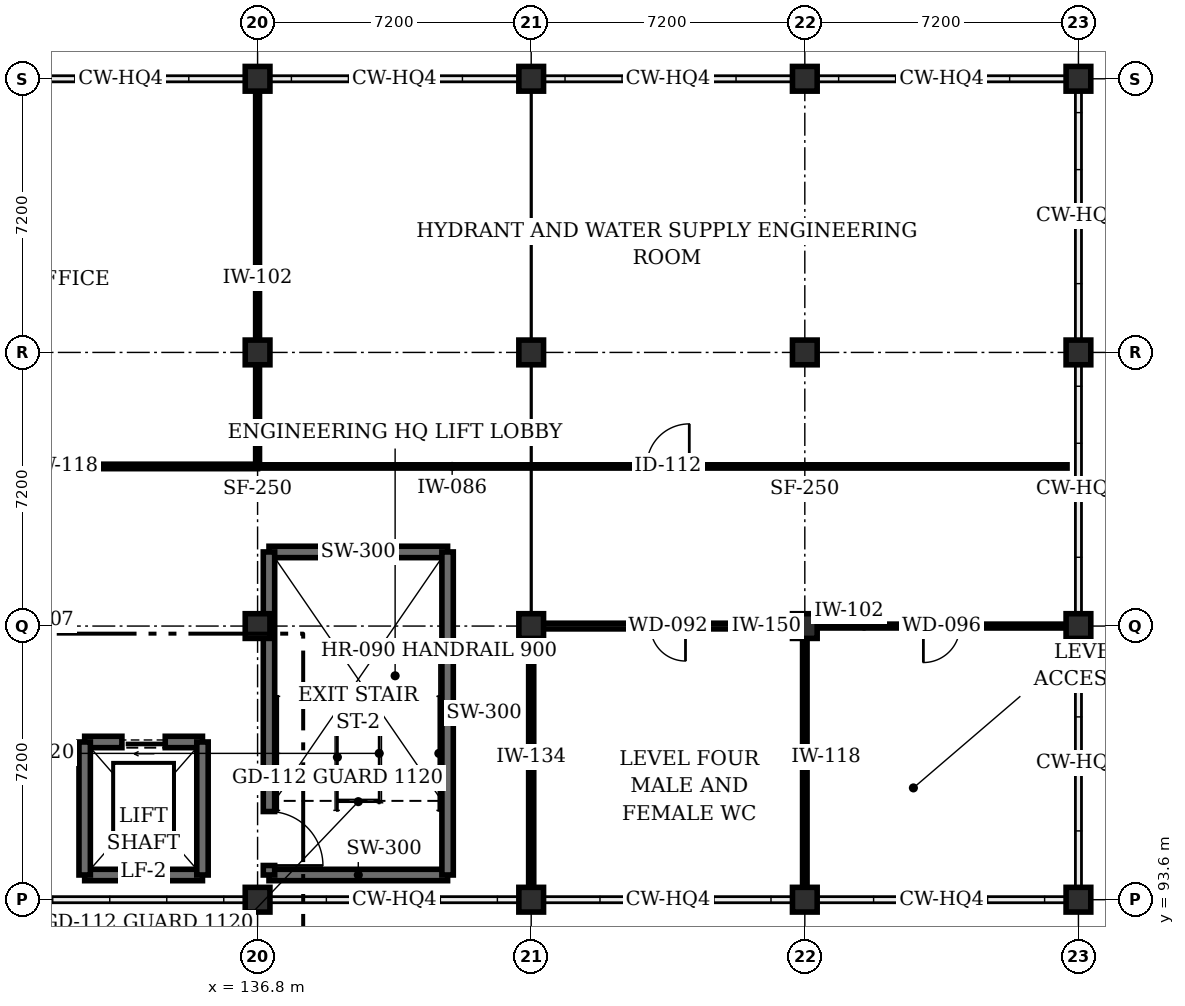
"""IFC4 building model, lengths in metres.
Left out: names, types, materials, properties, quantities, classifications, styles, units other than length and angle.
Written with IfcOpenShell. Run it as: python <this file> out.ifc"""

import sys

from ifc_helpers import new_model, si_unit, direction, frame, frame_2d, origin, origin_2d, place, context, subcontext, project, spatial, rectangle, extrude, element, fill, save


model = new_model("IFC4")
c1 = context("Model", 3, precision=1e-05, world=origin(), true_north=direction((0.0, 1.0)))
c2 = subcontext(c1, "Body", "Model", "MODEL_VIEW")
j1 = project(units=[si_unit("LENGTHUNIT", "METRE"), si_unit("PLANEANGLEUNIT", "RADIAN")], contexts=[c1])
p1 = place(None, origin())
s1 = spatial("IfcSite", under=j1, at=p1, CompositionType="ELEMENT")
p2 = place(p1, origin())
s2 = spatial("IfcBuilding", under=s1, at=p2, CompositionType="ELEMENT")
p3 = place(p2, frame((0.0, 0.0, 14.4)))
s3 = spatial("IfcBuildingStorey", under=s2, at=p3, CompositionType="ELEMENT", Elevation=14.4)
for number, where, z_axis, x_axis in (
    (1, (136.8, 93.6, 0.0), (0.0, 0.0, 1.0), (1.0, 0.0, 0.0)),
    (2, (136.8, 100.8, 0.0), (0.0, 0.0, 1.0), (1.0, 0.0, 0.0)),
    (3, (136.8, 108.0, 0.0), (0.0, 0.0, 1.0), (1.0, 0.0, 0.0)),
    (4, (136.8, 115.2, 0.0), (0.0, 0.0, 1.0), (1.0, 0.0, 0.0)),
    (5, (144.0, 93.6, 0.0), (0.0, 0.0, 1.0), (1.0, 0.0, 0.0)),
    (6, (144.0, 100.8, 0.0), (0.0, 0.0, 1.0), (1.0, 0.0, 0.0)),
    (7, (144.0, 108.0, 0.0), (0.0, 0.0, 1.0), (1.0, 0.0, 0.0)),
    (8, (144.0, 115.2, 0.0), (0.0, 0.0, 1.0), (1.0, 0.0, 0.0)),
    (9, (151.2, 93.6, 0.0), (0.0, 0.0, 1.0), (1.0, 0.0, 0.0)),
    (10, (151.2, 100.8, 0.0), (0.0, 0.0, 1.0), (1.0, 0.0, 0.0)),
    (11, (151.2, 108.0, 0.0), (0.0, 0.0, 1.0), (1.0, 0.0, 0.0)),
    (12, (151.2, 115.2, 0.0), (0.0, 0.0, 1.0), (1.0, 0.0, 0.0)),
    (13, (158.4, 93.6, 0.0), (0.0, 0.0, 1.0), (1.0, 0.0, 0.0)),
    (14, (158.4, 100.8, 0.0), (0.0, 0.0, 1.0), (1.0, 0.0, 0.0)),
    (15, (158.4, 108.0, 0.0), (0.0, 0.0, 1.0), (1.0, 0.0, 0.0)),
    (16, (158.4, 115.2, 0.0), (0.0, 0.0, 1.0), (1.0, 0.0, 0.0)),
):
    element("IfcColumn", number, at=place(p3, frame(where, z_axis=z_axis, x_axis=x_axis)), inside=s3, PredefinedType="COLUMN", context=c2, shape_type="SweptSolid", body=[
        extrude(rectangle(XDim=0.65, YDim=0.65, at=origin_2d()), origin(), (0.0, 0.0, 1.0), 3.6),
    ])
for number, where, z_axis, x_axis in (
    (17, (137.1, 94.25, 0.0), (0.0, 0.0, 1.0), (1.0, 0.0, 0.0)),
    (18, (141.8, 102.75, 0.0), (0.0, 0.0, 1.0), (-1.0, 0.0, 0.0)),
):
    element("IfcWall", number, at=place(p3, frame(where, z_axis=z_axis, x_axis=x_axis)), inside=s3, PredefinedType="SHEAR", context=c2, shape_type="SweptSolid", body=[
        extrude(rectangle(XDim=4.7, YDim=0.3, at=frame_2d((2.35, 0.0))), origin(), (0.0, 0.0, 1.0), 3.36),
    ])
p4 = place(p3, frame((137.1, 102.75, 0.0), z_axis=(0.0, 0.0, 1.0), x_axis=(0.0, -1.0, 0.0)))
e19 = element("IfcWall", 19, at=p4, inside=s3, PredefinedType="SHEAR", context=c2, shape_type="SweptSolid", body=[
    extrude(rectangle(XDim=8.5, YDim=0.3, at=frame_2d((4.25, 0.0))), origin(), (0.0, 0.0, 1.0), 3.36),
])
p5 = place(p4, frame((6.83, 0.0, 0.0)))
e20 = element("IfcOpeningElement", 20, at=p5, cuts=e19, PredefinedType="OPENING", context=c2, shape_type="SweptSolid", body=[
    extrude(rectangle(XDim=1.42, YDim=2.22, at=frame_2d((0.71, 1.11))), frame((0.0, 0.16, 0.0), z_axis=(0.0, -1.0, 0.0), x_axis=(1.0, 0.0, 0.0)), (0.0, 0.0, 1.0), 0.32),
])
p6 = place(p3, frame((141.8, 94.25, 0.0), z_axis=(0.0, 0.0, 1.0), x_axis=(0.0, 1.0, 0.0)))
e21 = element("IfcWall", 21, at=p6, inside=s3, PredefinedType="SHEAR", context=c2, shape_type="SweptSolid", body=[
    extrude(rectangle(XDim=8.5, YDim=0.3, at=frame_2d((4.25, 0.0))), origin(), (0.0, 0.0, 1.0), 3.36),
])
p7 = place(p3, frame((132.25, 94.25, 0.0), z_axis=(0.0, 0.0, 1.0), x_axis=(1.0, 0.0, 0.0)))
e22 = element("IfcWall", 22, at=p7, inside=s3, PredefinedType="SHEAR", context=c2, shape_type="SweptSolid", body=[
    extrude(rectangle(XDim=3.1, YDim=0.3, at=frame_2d((1.55, 0.0))), origin(), (0.0, 0.0, 1.0), 3.36),
])
p8 = place(p3, frame((135.35, 97.75, 0.0), z_axis=(0.0, 0.0, 1.0), x_axis=(-1.0, 0.0, 0.0)))
e23 = element("IfcWall", 23, at=p8, inside=s3, PredefinedType="SHEAR", context=c2, shape_type="SweptSolid", body=[
    extrude(rectangle(XDim=3.1, YDim=0.3, at=frame_2d((1.55, 0.0))), origin(), (0.0, 0.0, 1.0), 3.36),
])
p9 = place(p8, frame((0.98, 0.0, 0.0)))
e24 = element("IfcOpeningElement", 24, at=p9, cuts=e23, PredefinedType="OPENING", context=c2, shape_type="SweptSolid", body=[
    extrude(rectangle(XDim=1.14, YDim=2.24, at=frame_2d((0.57, 1.12))), frame((0.0, 0.16, 0.0), z_axis=(0.0, -1.0, 0.0), x_axis=(1.0, 0.0, 0.0)), (0.0, 0.0, 1.0), 0.32),
])
for number, where, z_axis, x_axis in (
    (25, (132.25, 97.75, 0.0), (0.0, 0.0, 1.0), (0.0, -1.0, 0.0)),
    (26, (135.35, 94.25, 0.0), (0.0, 0.0, 1.0), (0.0, 1.0, 0.0)),
):
    element("IfcWall", number, at=place(p3, frame(where, z_axis=z_axis, x_axis=x_axis)), inside=s3, PredefinedType="SHEAR", context=c2, shape_type="SweptSolid", body=[
        extrude(rectangle(XDim=3.5, YDim=0.3, at=frame_2d((1.75, 0.0))), origin(), (0.0, 0.0, 1.0), 3.36),
    ])
p10 = place(p3, frame((115.5, 105.0, 0.0), z_axis=(0.0, 0.0, 1.0), x_axis=(1.0, 0.0, 0.0)))
e27 = element("IfcWall", 27, at=p10, inside=s3, PredefinedType="STANDARD", context=c2, shape_type="SweptSolid", body=[
    extrude(rectangle(XDim=21.3, YDim=0.118, at=frame_2d((10.65, 0.0))), origin(), (0.0, 0.0, 1.0), 2.827),
])
p11 = place(p10, frame((9.93, 0.0, 0.0)))
e28 = element("IfcOpeningElement", 28, at=p11, cuts=e27, PredefinedType="OPENING", context=c2, shape_type="SweptSolid", body=[
    extrude(rectangle(XDim=1.14, YDim=2.2, at=frame_2d((0.57, 1.1))), frame((0.0, 0.069, 0.0), z_axis=(0.0, -1.0, 0.0), x_axis=(1.0, 0.0, 0.0)), (0.0, 0.0, 1.0), 0.138),
])
p12 = place(p3, frame((136.8, 105.0, 0.0), z_axis=(0.0, 0.0, 1.0), x_axis=(0.0, 1.0, 0.0)))
e29 = element("IfcWall", 29, at=p12, inside=s3, PredefinedType="STANDARD", context=c2, shape_type="SweptSolid", body=[
    extrude(rectangle(XDim=9.9, YDim=0.102, at=frame_2d((4.95, 0.0))), origin(), (0.0, 0.0, 1.0), 2.827),
])
p13 = place(p3, frame((136.8, 105.0, 0.0), z_axis=(0.0, 0.0, 1.0), x_axis=(1.0, 0.0, 0.0)))
e30 = element("IfcWall", 30, at=p13, inside=s3, PredefinedType="STANDARD", context=c2, shape_type="SweptSolid", body=[
    extrude(rectangle(XDim=21.3, YDim=0.086, at=frame_2d((10.65, 0.0))), origin(), (0.0, 0.0, 1.0), 2.827),
])
p14 = place(p13, frame((10.24, 0.0, 0.0)))
e31 = element("IfcOpeningElement", 31, at=p14, cuts=e30, PredefinedType="OPENING", context=c2, shape_type="SweptSolid", body=[
    extrude(rectangle(XDim=1.12, YDim=2.2, at=frame_2d((0.56, 1.1))), frame((0.0, 0.053, 0.0), z_axis=(0.0, -1.0, 0.0), x_axis=(1.0, 0.0, 0.0)), (0.0, 0.0, 1.0), 0.106),
])
p15 = place(p3, frame((151.2, 100.8, 0.0), z_axis=(0.0, 0.0, 1.0), x_axis=(-1.0, 0.0, 0.0)))
e32 = element("IfcWall", 32, at=p15, inside=s3, PredefinedType="STANDARD", context=c2, shape_type="SweptSolid", body=[
    extrude(rectangle(XDim=7.2, YDim=0.15, at=frame_2d((3.6, 0.0))), origin(), (0.0, 0.0, 1.0), 2.827),
])
p16 = place(p15, frame((3.14, 0.0, 0.0)))
e33 = element("IfcOpeningElement", 33, at=p16, cuts=e32, PredefinedType="OPENING", context=c2, shape_type="SweptSolid", body=[
    extrude(rectangle(XDim=0.92, YDim=2.1, at=frame_2d((0.46, 1.05))), frame((0.0, 0.085, 0.0), z_axis=(0.0, -1.0, 0.0), x_axis=(1.0, 0.0, 0.0)), (0.0, 0.0, 1.0), 0.17),
])
p17 = place(p3, frame((144.0, 100.8, 0.0), z_axis=(0.0, 0.0, 1.0), x_axis=(0.0, -1.0, 0.0)))
e34 = element("IfcWall", 34, at=p17, inside=s3, PredefinedType="STANDARD", context=c2, shape_type="SweptSolid", body=[
    extrude(rectangle(XDim=6.9, YDim=0.134, at=frame_2d((3.45, 0.0))), origin(), (0.0, 0.0, 1.0), 2.827),
])
p18 = place(p3, frame((151.2, 93.9, 0.0), z_axis=(0.0, 0.0, 1.0), x_axis=(0.0, 1.0, 0.0)))
e35 = element("IfcWall", 35, at=p18, inside=s3, PredefinedType="STANDARD", context=c2, shape_type="SweptSolid", body=[
    extrude(rectangle(XDim=6.9, YDim=0.118, at=frame_2d((3.45, 0.0))), origin(), (0.0, 0.0, 1.0), 2.827),
])
p19 = place(p3, frame((158.1, 100.8, 0.0), z_axis=(0.0, 0.0, 1.0), x_axis=(-1.0, 0.0, 0.0)))
e36 = element("IfcWall", 36, at=p19, inside=s3, PredefinedType="STANDARD", context=c2, shape_type="SweptSolid", body=[
    extrude(rectangle(XDim=6.9, YDim=0.102, at=frame_2d((3.45, 0.0))), origin(), (0.0, 0.0, 1.0), 2.827),
])
p20 = place(p19, frame((2.82, 0.0, 0.0)))
e37 = element("IfcOpeningElement", 37, at=p20, cuts=e36, PredefinedType="OPENING", context=c2, shape_type="SweptSolid", body=[
    extrude(rectangle(XDim=0.96, YDim=2.1, at=frame_2d((0.48, 1.05))), frame((0.0, 0.061, 0.0), z_axis=(0.0, -1.0, 0.0), x_axis=(1.0, 0.0, 0.0)), (0.0, 0.0, 1.0), 0.122),
])
p21 = place(p5, origin())
e38 = element("IfcDoor", 38, at=p21, inside=s3, OperationType="SINGLE_SWING_RIGHT", PredefinedType="DOOR", context=c2, shape_type="SweptSolid", body=[
    extrude(rectangle(XDim=1.42, YDim=2.22, at=frame_2d((0.71, 1.11))), frame((0.0, 0.025, 0.0), z_axis=(0.0, -1.0, 0.0), x_axis=(1.0, 0.0, 0.0)), (0.0, 0.0, 1.0), 0.05),
])
fill(e20, e38)
p22 = place(p9, origin())
e39 = element("IfcDoor", 39, at=p22, inside=s3, OperationType="SLIDING_TO_LEFT", PredefinedType="DOOR", context=c2, shape_type="SweptSolid", body=[
    extrude(rectangle(XDim=1.14, YDim=2.24, at=frame_2d((0.57, 1.12))), frame((0.0, 0.025, 0.0), z_axis=(0.0, -1.0, 0.0), x_axis=(1.0, 0.0, 0.0)), (0.0, 0.0, 1.0), 0.05),
])
fill(e24, e39)
p23 = place(p14, origin())
e40 = element("IfcDoor", 40, at=p23, inside=s3, OperationType="SINGLE_SWING_RIGHT", PredefinedType="DOOR", context=c2, shape_type="SweptSolid", body=[
    extrude(rectangle(XDim=1.12, YDim=2.2, at=frame_2d((0.56, 1.1))), frame((0.0, 0.025, 0.0), z_axis=(0.0, -1.0, 0.0), x_axis=(1.0, 0.0, 0.0)), (0.0, 0.0, 1.0), 0.05),
])
fill(e31, e40)
p24 = place(p16, origin())
e41 = element("IfcDoor", 41, at=p24, inside=s3, OperationType="SINGLE_SWING_LEFT", PredefinedType="DOOR", context=c2, shape_type="SweptSolid", body=[
    extrude(rectangle(XDim=0.92, YDim=2.1, at=frame_2d((0.46, 1.05))), frame((0.0, 0.025, 0.0), z_axis=(0.0, -1.0, 0.0), x_axis=(1.0, 0.0, 0.0)), (0.0, 0.0, 1.0), 0.05),
])
fill(e33, e41)
p25 = place(p20, origin())
e42 = element("IfcDoor", 42, at=p25, inside=s3, OperationType="SINGLE_SWING_RIGHT", PredefinedType="DOOR", context=c2, shape_type="SweptSolid", body=[
    extrude(rectangle(XDim=0.96, YDim=2.1, at=frame_2d((0.48, 1.05))), frame((0.0, 0.025, 0.0), z_axis=(0.0, -1.0, 0.0), x_axis=(1.0, 0.0, 0.0)), (0.0, 0.0, 1.0), 0.05),
])
fill(e37, e42)
save(model, sys.argv[1])
